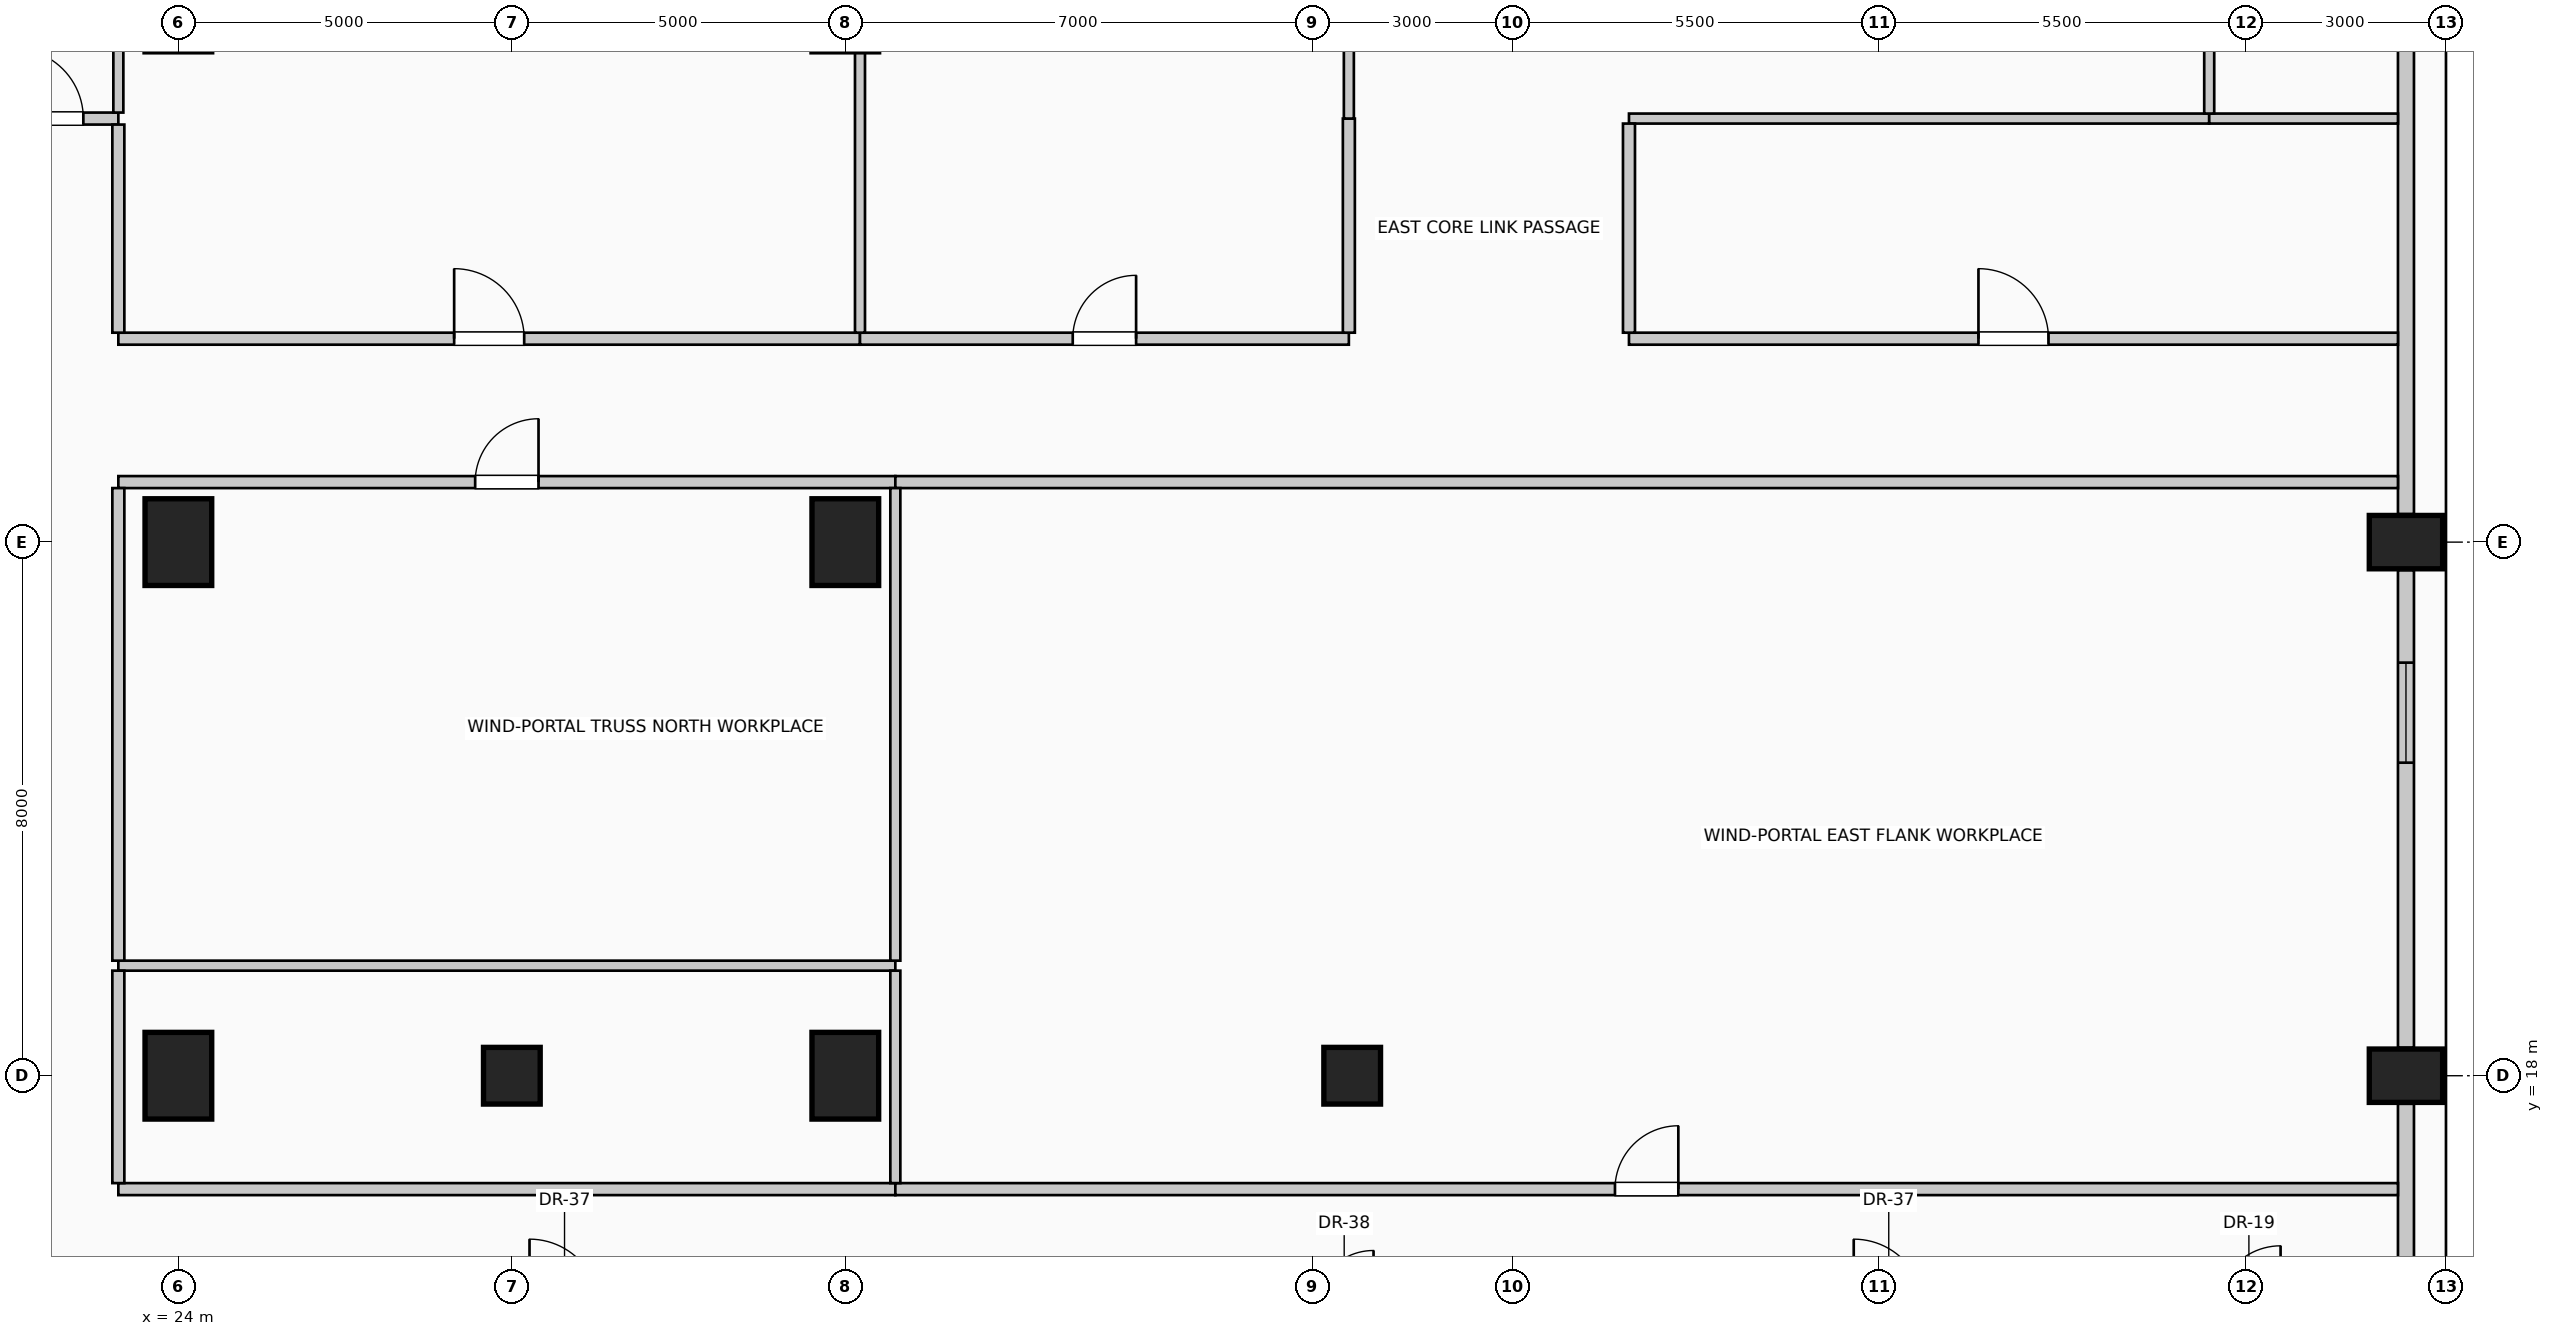
"""IFC4 building model, lengths in metres.
Left out: names, types, materials, properties, quantities, classifications, styles, units other than length and angle.
Written with IfcOpenShell. Run it as: python <this file> out.ifc"""

import sys

from ifc_helpers import new_model, si_unit, direction, frame, frame_2d, origin, origin_2d, place, context, subcontext, project, spatial, rectangle, circle, extrude, element, fill, save


model = new_model("IFC4")
c1 = context("Model", 3, precision=1e-05, world=origin(), true_north=direction((0.0, 1.0)))
c2 = subcontext(c1, "Body", "Model", "MODEL_VIEW")
j1 = project(units=[si_unit("LENGTHUNIT", "METRE"), si_unit("PLANEANGLEUNIT", "RADIAN")], contexts=[c1])
p1 = place(None, origin())
s1 = spatial("IfcSite", under=j1, at=p1, CompositionType="ELEMENT")
p2 = place(p1, origin())
s2 = spatial("IfcBuilding", under=s1, at=p2, CompositionType="ELEMENT")
p3 = place(p2, frame((0.0, 0.0, 210.6)))
s3 = spatial("IfcBuildingStorey", under=s2, at=p3, CompositionType="ELEMENT", Elevation=210.6)
for number, where, z_axis, x_axis in (
    (1, (57.4, 18.0, 0.0), (0.0, 0.0, 1.0), (0.0, 1.0, 0.0)),
    (2, (57.4, 26.0, 0.0), (0.0, 0.0, 1.0), (0.0, 1.0, 0.0)),
):
    element("IfcColumn", number, at=place(p3, frame(where, z_axis=z_axis, x_axis=x_axis)), inside=s3, PredefinedType="COLUMN", context=c2, shape_type="SweptSolid", body=[
        extrude(rectangle(XDim=0.8, YDim=1.1, at=origin_2d()), origin(), (0.0, 0.0, 1.0), 4.0),
    ])
for number, where, z_axis, x_axis in (
    (3, (24.0, 18.0, 0.0), (0.0, 0.0, 1.0), (1.0, 0.0, 0.0)),
    (4, (34.0, 18.0, 0.0), (0.0, 0.0, 1.0), (1.0, 0.0, 0.0)),
    (5, (24.0, 26.0, 0.0), (0.0, 0.0, 1.0), (1.0, 0.0, 0.0)),
    (6, (34.0, 26.0, 0.0), (0.0, 0.0, 1.0), (1.0, 0.0, 0.0)),
    (7, (24.0, 34.0, 0.0), (0.0, 0.0, 1.0), (1.0, 0.0, 0.0)),
    (8, (34.0, 34.0, 0.0), (0.0, 0.0, 1.0), (1.0, 0.0, 0.0)),
):
    element("IfcColumn", number, at=place(p3, frame(where, z_axis=z_axis, x_axis=x_axis)), inside=s3, PredefinedType="COLUMN", context=c2, shape_type="SweptSolid", body=[
        extrude(rectangle(XDim=1.0, YDim=1.3, at=origin_2d()), origin(), (0.0, 0.0, 1.0), 4.0),
    ])
for number, where, z_axis, x_axis in (
    (9, (29.0, 18.0, 0.0), (0.0, 0.0, 1.0), (1.0, 0.0, 0.0)),
    (10, (41.6, 18.0, 0.0), (0.0, 0.0, 1.0), (1.0, 0.0, 0.0)),
):
    element("IfcColumn", number, at=place(p3, frame(where, z_axis=z_axis, x_axis=x_axis)), inside=s3, PredefinedType="COLUMN", context=c2, shape_type="SweptSolid", body=[
        extrude(circle(Radius=0.425, at=origin_2d()), origin(), (0.0, 0.0, 1.0), 4.0),
    ])
p4 = place(p3, frame((57.4, 17.58, 0.0), z_axis=(0.0, 0.0, 1.0), x_axis=(0.0, -1.0, 0.0)))
e11 = element("IfcWall", 11, at=p4, inside=s3, PredefinedType="SOLIDWALL", context=c2, shape_type="SweptSolid", body=[
    extrude(rectangle(XDim=7.16, YDim=0.24, at=frame_2d((3.58, 0.0))), origin(), (0.0, 0.0, 1.0), 3.0),
])
p5 = place(p4, frame((4.273, 0.0, 0.42)))
e12 = element("IfcOpeningElement", 12, at=p5, cuts=e11, PredefinedType="OPENING", context=c2, shape_type="SweptSolid", body=[
    extrude(rectangle(XDim=1.5, YDim=2.2, at=frame_2d((0.75, 1.1))), frame((0.0, 0.13, 0.0), z_axis=(0.0, -1.0, 0.0), x_axis=(1.0, 0.0, 0.0)), (0.0, 0.0, 1.0), 0.26),
])
p6 = place(p3, frame((57.4, 25.58, 0.0), z_axis=(0.0, 0.0, 1.0), x_axis=(0.0, -1.0, 0.0)))
e13 = element("IfcWall", 13, at=p6, inside=s3, PredefinedType="SOLIDWALL", context=c2, shape_type="SweptSolid", body=[
    extrude(rectangle(XDim=7.16, YDim=0.24, at=frame_2d((3.58, 0.0))), origin(), (0.0, 0.0, 1.0), 3.0),
])
p7 = place(p6, frame((1.387, 0.0, 0.42)))
e14 = element("IfcOpeningElement", 14, at=p7, cuts=e13, PredefinedType="OPENING", context=c2, shape_type="SweptSolid", body=[
    extrude(rectangle(XDim=1.5, YDim=2.2, at=frame_2d((0.75, 1.1))), frame((0.0, 0.13, 0.0), z_axis=(0.0, -1.0, 0.0), x_axis=(1.0, 0.0, 0.0)), (0.0, 0.0, 1.0), 0.26),
])
p8 = place(p3, frame((57.4, 33.58, 0.0), z_axis=(0.0, 0.0, 1.0), x_axis=(0.0, -1.0, 0.0)))
e15 = element("IfcWall", 15, at=p8, inside=s3, PredefinedType="SOLIDWALL", context=c2, shape_type="SweptSolid", body=[
    extrude(rectangle(XDim=7.16, YDim=0.24, at=frame_2d((3.58, 0.0))), origin(), (0.0, 0.0, 1.0), 3.0),
])
p9 = place(p3, frame((23.1, 16.3, 0.0), z_axis=(0.0, 0.0, 1.0), x_axis=(1.0, 0.0, 0.0)))
e16 = element("IfcWall", 16, at=p9, inside=s3, PredefinedType="PARTITIONING", context=c2, shape_type="SweptSolid", body=[
    extrude(rectangle(XDim=11.65, YDim=0.18, at=frame_2d((5.825, 0.0))), origin(), (0.0, 0.0, 1.0), 3.75),
])
p10 = place(p3, frame((34.75, 16.3, 0.0), z_axis=(0.0, 0.0, 1.0), x_axis=(1.0, 0.0, 0.0)))
e17 = element("IfcWall", 17, at=p10, inside=s3, PredefinedType="PARTITIONING", context=c2, shape_type="SweptSolid", body=[
    extrude(rectangle(XDim=22.53, YDim=0.18, at=frame_2d((11.265, 0.0))), origin(), (0.0, 0.0, 1.0), 3.75),
])
p11 = place(p10, frame((10.79, 0.0, 0.0)))
e18 = element("IfcOpeningElement", 18, at=p11, cuts=e17, PredefinedType="OPENING", context=c2, shape_type="SweptSolid", body=[
    extrude(rectangle(XDim=0.95, YDim=2.15, at=frame_2d((0.475, 1.075))), frame((0.0, 0.1, 0.0), z_axis=(0.0, -1.0, 0.0), x_axis=(1.0, 0.0, 0.0)), (0.0, 0.0, 1.0), 0.2),
])
p12 = place(p3, frame((23.1, 19.65, 0.0), z_axis=(0.0, 0.0, 1.0), x_axis=(1.0, 0.0, 0.0)))
e19 = element("IfcWall", 19, at=p12, inside=s3, PredefinedType="PARTITIONING", context=c2, shape_type="SweptSolid", body=[
    extrude(rectangle(XDim=11.65, YDim=0.15, at=frame_2d((5.825, 0.0))), origin(), (0.0, 0.0, 1.0), 3.75),
])
p13 = place(p3, frame((23.1, 26.9, 0.0), z_axis=(0.0, 0.0, 1.0), x_axis=(1.0, 0.0, 0.0)))
e20 = element("IfcWall", 20, at=p13, inside=s3, PredefinedType="PARTITIONING", context=c2, shape_type="SweptSolid", body=[
    extrude(rectangle(XDim=11.65, YDim=0.18, at=frame_2d((5.825, 0.0))), origin(), (0.0, 0.0, 1.0), 3.75),
])
p14 = place(p13, frame((5.35, 0.0, 0.0)))
e21 = element("IfcOpeningElement", 21, at=p14, cuts=e20, PredefinedType="OPENING", context=c2, shape_type="SweptSolid", body=[
    extrude(rectangle(XDim=0.95, YDim=2.15, at=frame_2d((0.475, 1.075))), frame((0.0, 0.1, 0.0), z_axis=(0.0, -1.0, 0.0), x_axis=(1.0, 0.0, 0.0)), (0.0, 0.0, 1.0), 0.2),
])
p15 = place(p3, frame((34.75, 26.9, 0.0), z_axis=(0.0, 0.0, 1.0), x_axis=(1.0, 0.0, 0.0)))
e22 = element("IfcWall", 22, at=p15, inside=s3, PredefinedType="PARTITIONING", context=c2, shape_type="SweptSolid", body=[
    extrude(rectangle(XDim=22.53, YDim=0.18, at=frame_2d((11.265, 0.0))), origin(), (0.0, 0.0, 1.0), 3.75),
])
p16 = place(p3, frame((23.1, 29.05, 0.0), z_axis=(0.0, 0.0, 1.0), x_axis=(1.0, 0.0, 0.0)))
e23 = element("IfcWall", 23, at=p16, inside=s3, PredefinedType="PARTITIONING", context=c2, shape_type="SweptSolid", body=[
    extrude(rectangle(XDim=11.12, YDim=0.18, at=frame_2d((5.56, 0.0))), origin(), (0.0, 0.0, 1.0), 3.75),
])
p17 = place(p16, frame((5.035, 0.0, 0.0)))
e24 = element("IfcOpeningElement", 24, at=p17, cuts=e23, PredefinedType="OPENING", context=c2, shape_type="SweptSolid", body=[
    extrude(rectangle(XDim=1.05, YDim=2.15, at=frame_2d((0.525, 1.075))), frame((0.0, 0.1, 0.0), z_axis=(0.0, -1.0, 0.0), x_axis=(1.0, 0.0, 0.0)), (0.0, 0.0, 1.0), 0.2),
])
p18 = place(p3, frame((34.22, 29.05, 0.0), z_axis=(0.0, 0.0, 1.0), x_axis=(1.0, 0.0, 0.0)))
e25 = element("IfcWall", 25, at=p18, inside=s3, PredefinedType="PARTITIONING", context=c2, shape_type="SweptSolid", body=[
    extrude(rectangle(XDim=7.33, YDim=0.18, at=frame_2d((3.665, 0.0))), origin(), (0.0, 0.0, 1.0), 3.75),
])
p19 = place(p18, frame((3.19, 0.0, 0.0)))
e26 = element("IfcOpeningElement", 26, at=p19, cuts=e25, PredefinedType="OPENING", context=c2, shape_type="SweptSolid", body=[
    extrude(rectangle(XDim=0.95, YDim=2.15, at=frame_2d((0.475, 1.075))), frame((0.0, 0.1, 0.0), z_axis=(0.0, -1.0, 0.0), x_axis=(1.0, 0.0, 0.0)), (0.0, 0.0, 1.0), 0.2),
])
p20 = place(p3, frame((45.75, 29.05, 0.0), z_axis=(0.0, 0.0, 1.0), x_axis=(1.0, 0.0, 0.0)))
e27 = element("IfcWall", 27, at=p20, inside=s3, PredefinedType="PARTITIONING", context=c2, shape_type="SweptSolid", body=[
    extrude(rectangle(XDim=11.53, YDim=0.18, at=frame_2d((5.765, 0.0))), origin(), (0.0, 0.0, 1.0), 3.75),
])
p21 = place(p20, frame((5.24, 0.0, 0.0)))
e28 = element("IfcOpeningElement", 28, at=p21, cuts=e27, PredefinedType="OPENING", context=c2, shape_type="SweptSolid", body=[
    extrude(rectangle(XDim=1.05, YDim=2.15, at=frame_2d((0.525, 1.075))), frame((0.0, 0.1, 0.0), z_axis=(0.0, -1.0, 0.0), x_axis=(1.0, 0.0, 0.0)), (0.0, 0.0, 1.0), 0.2),
])
p22 = place(p3, frame((21.0, 32.35, 0.0), z_axis=(0.0, 0.0, 1.0), x_axis=(1.0, 0.0, 0.0)))
e29 = element("IfcWall", 29, at=p22, inside=s3, PredefinedType="PARTITIONING", context=c2, shape_type="SweptSolid", body=[
    extrude(rectangle(XDim=2.1, YDim=0.18, at=frame_2d((1.05, 0.0))), origin(), (0.0, 0.0, 1.0), 3.75),
])
p23 = place(p22, frame((0.525, 0.0, 0.0)))
e30 = element("IfcOpeningElement", 30, at=p23, cuts=e29, PredefinedType="OPENING", context=c2, shape_type="SweptSolid", body=[
    extrude(rectangle(XDim=1.05, YDim=2.15, at=frame_2d((0.525, 1.075))), frame((0.0, 0.1, 0.0), z_axis=(0.0, -1.0, 0.0), x_axis=(1.0, 0.0, 0.0)), (0.0, 0.0, 1.0), 0.2),
])
p24 = place(p3, frame((45.75, 32.35, 0.0), z_axis=(0.0, 0.0, 1.0), x_axis=(1.0, 0.0, 0.0)))
e31 = element("IfcWall", 31, at=p24, inside=s3, PredefinedType="PARTITIONING", context=c2, shape_type="SweptSolid", body=[
    extrude(rectangle(XDim=8.7, YDim=0.15, at=frame_2d((4.35, 0.0))), origin(), (0.0, 0.0, 1.0), 3.75),
])
p25 = place(p3, frame((54.45, 32.35, 0.0), z_axis=(0.0, 0.0, 1.0), x_axis=(1.0, 0.0, 0.0)))
e32 = element("IfcWall", 32, at=p25, inside=s3, PredefinedType="PARTITIONING", context=c2, shape_type="SweptSolid", body=[
    extrude(rectangle(XDim=2.83, YDim=0.15, at=frame_2d((1.415, 0.0))), origin(), (0.0, 0.0, 1.0), 3.75),
])
p26 = place(p3, frame((23.1, 16.39, 0.0), z_axis=(0.0, 0.0, 1.0), x_axis=(0.0, 1.0, 0.0)))
e33 = element("IfcWall", 33, at=p26, inside=s3, PredefinedType="PARTITIONING", context=c2, shape_type="SweptSolid", body=[
    extrude(rectangle(XDim=3.185, YDim=0.18, at=frame_2d((1.593, 0.0))), origin(), (0.0, 0.0, 1.0), 3.75),
])
p27 = place(p3, frame((23.1, 19.725, 0.0), z_axis=(0.0, 0.0, 1.0), x_axis=(0.0, 1.0, 0.0)))
e34 = element("IfcWall", 34, at=p27, inside=s3, PredefinedType="PARTITIONING", context=c2, shape_type="SweptSolid", body=[
    extrude(rectangle(XDim=7.085, YDim=0.18, at=frame_2d((3.542, 0.0))), origin(), (0.0, 0.0, 1.0), 3.75),
])
p28 = place(p3, frame((23.1, 29.14, 0.0), z_axis=(0.0, 0.0, 1.0), x_axis=(0.0, 1.0, 0.0)))
e35 = element("IfcWall", 35, at=p28, inside=s3, PredefinedType="PARTITIONING", context=c2, shape_type="SweptSolid", body=[
    extrude(rectangle(XDim=3.12, YDim=0.18, at=frame_2d((1.56, 0.0))), origin(), (0.0, 0.0, 1.0), 3.75),
])
p29 = place(p3, frame((23.1, 32.44, 0.0), z_axis=(0.0, 0.0, 1.0), x_axis=(0.0, 1.0, 0.0)))
e36 = element("IfcWall", 36, at=p29, inside=s3, PredefinedType="PARTITIONING", context=c2, shape_type="SweptSolid", body=[
    extrude(rectangle(XDim=12.84, YDim=0.15, at=frame_2d((6.42, 0.0))), origin(), (0.0, 0.0, 1.0), 3.75),
])
p30 = place(p3, frame((34.22, 29.14, 0.0), z_axis=(0.0, 0.0, 1.0), x_axis=(0.0, 1.0, 0.0)))
e37 = element("IfcWall", 37, at=p30, inside=s3, PredefinedType="PARTITIONING", context=c2, shape_type="SweptSolid", body=[
    extrude(rectangle(XDim=4.21, YDim=0.15, at=frame_2d((2.105, 0.0))), origin(), (0.0, 0.0, 1.0), 3.145),
])
p31 = place(p3, frame((34.75, 16.39, 0.0), z_axis=(0.0, 0.0, 1.0), x_axis=(0.0, 1.0, 0.0)))
e38 = element("IfcWall", 38, at=p31, inside=s3, PredefinedType="PARTITIONING", context=c2, shape_type="SweptSolid", body=[
    extrude(rectangle(XDim=3.185, YDim=0.15, at=frame_2d((1.593, 0.0))), origin(), (0.0, 0.0, 1.0), 3.75),
])
p32 = place(p3, frame((34.75, 19.725, 0.0), z_axis=(0.0, 0.0, 1.0), x_axis=(0.0, 1.0, 0.0)))
e39 = element("IfcWall", 39, at=p32, inside=s3, PredefinedType="PARTITIONING", context=c2, shape_type="SweptSolid", body=[
    extrude(rectangle(XDim=7.085, YDim=0.15, at=frame_2d((3.542, 0.0))), origin(), (0.0, 0.0, 1.0), 3.75),
])
p33 = place(p3, frame((41.55, 29.14, 0.0), z_axis=(0.0, 0.0, 1.0), x_axis=(0.0, 1.0, 0.0)))
e40 = element("IfcWall", 40, at=p33, inside=s3, PredefinedType="PARTITIONING", context=c2, shape_type="SweptSolid", body=[
    extrude(rectangle(XDim=3.21, YDim=0.18, at=frame_2d((1.605, 0.0))), origin(), (0.0, 0.0, 1.0), 3.145),
])
p34 = place(p3, frame((41.55, 32.35, 0.0), z_axis=(0.0, 0.0, 1.0), x_axis=(0.0, 1.0, 0.0)))
e41 = element("IfcWall", 41, at=p34, inside=s3, PredefinedType="PARTITIONING", context=c2, shape_type="SweptSolid", body=[
    extrude(rectangle(XDim=1.225, YDim=0.15, at=frame_2d((0.612, 0.0))), origin(), (0.0, 0.0, 1.0), 3.145),
])
p35 = place(p3, frame((45.75, 29.14, 0.0), z_axis=(0.0, 0.0, 1.0), x_axis=(0.0, 1.0, 0.0)))
e42 = element("IfcWall", 42, at=p35, inside=s3, PredefinedType="PARTITIONING", context=c2, shape_type="SweptSolid", body=[
    extrude(rectangle(XDim=3.135, YDim=0.18, at=frame_2d((1.567, 0.0))), origin(), (0.0, 0.0, 1.0), 3.75),
])
p36 = place(p3, frame((54.45, 32.425, 0.0), z_axis=(0.0, 0.0, 1.0), x_axis=(0.0, 1.0, 0.0)))
e43 = element("IfcWall", 43, at=p36, inside=s3, PredefinedType="PARTITIONING", context=c2, shape_type="SweptSolid", body=[
    extrude(rectangle(XDim=1.725, YDim=0.15, at=frame_2d((0.862, 0.0))), origin(), (0.0, 0.0, 1.0), 3.75),
])
p37 = place(p7, origin())
e44 = element("IfcWindow", 44, at=p37, inside=s3, PartitioningType="SINGLE_PANEL", PredefinedType="WINDOW", context=c2, shape_type="SweptSolid", body=[
    extrude(rectangle(XDim=1.5, YDim=2.2, at=frame_2d((0.75, 1.1))), frame((0.0, 0.03, 0.0), z_axis=(0.0, -1.0, 0.0), x_axis=(1.0, 0.0, 0.0)), (0.0, 0.0, 1.0), 0.06),
])
fill(e14, e44)
p38 = place(p11, origin())
e45 = element("IfcDoor", 45, at=p38, inside=s3, OperationType="SINGLE_SWING_RIGHT", PredefinedType="DOOR", context=c2, shape_type="SweptSolid", body=[
    extrude(rectangle(XDim=0.95, YDim=2.15, at=frame_2d((0.475, 1.075))), frame((0.0, 0.025, 0.0), z_axis=(0.0, -1.0, 0.0), x_axis=(1.0, 0.0, 0.0)), (0.0, 0.0, 1.0), 0.05),
])
fill(e18, e45)
p39 = place(p14, origin())
e46 = element("IfcDoor", 46, at=p39, inside=s3, OperationType="SINGLE_SWING_RIGHT", PredefinedType="DOOR", context=c2, shape_type="SweptSolid", body=[
    extrude(rectangle(XDim=0.95, YDim=2.15, at=frame_2d((0.475, 1.075))), frame((0.0, 0.025, 0.0), z_axis=(0.0, -1.0, 0.0), x_axis=(1.0, 0.0, 0.0)), (0.0, 0.0, 1.0), 0.05),
])
fill(e21, e46)
p40 = place(p17, origin())
e47 = element("IfcDoor", 47, at=p40, inside=s3, OperationType="SINGLE_SWING_LEFT", PredefinedType="DOOR", context=c2, shape_type="SweptSolid", body=[
    extrude(rectangle(XDim=1.05, YDim=2.15, at=frame_2d((0.525, 1.075))), frame((0.0, 0.025, 0.0), z_axis=(0.0, -1.0, 0.0), x_axis=(1.0, 0.0, 0.0)), (0.0, 0.0, 1.0), 0.05),
])
fill(e24, e47)
p41 = place(p19, origin())
e48 = element("IfcDoor", 48, at=p41, inside=s3, OperationType="SINGLE_SWING_RIGHT", PredefinedType="DOOR", context=c2, shape_type="SweptSolid", body=[
    extrude(rectangle(XDim=0.95, YDim=2.15, at=frame_2d((0.475, 1.075))), frame((0.0, 0.025, 0.0), z_axis=(0.0, -1.0, 0.0), x_axis=(1.0, 0.0, 0.0)), (0.0, 0.0, 1.0), 0.05),
])
fill(e26, e48)
p42 = place(p21, origin())
e49 = element("IfcDoor", 49, at=p42, inside=s3, OperationType="SINGLE_SWING_LEFT", PredefinedType="DOOR", context=c2, shape_type="SweptSolid", body=[
    extrude(rectangle(XDim=1.05, YDim=2.15, at=frame_2d((0.525, 1.075))), frame((0.0, 0.025, 0.0), z_axis=(0.0, -1.0, 0.0), x_axis=(1.0, 0.0, 0.0)), (0.0, 0.0, 1.0), 0.05),
])
fill(e28, e49)
p43 = place(p23, origin())
e50 = element("IfcDoor", 50, at=p43, inside=s3, OperationType="SINGLE_SWING_LEFT", PredefinedType="DOOR", context=c2, shape_type="SweptSolid", body=[
    extrude(rectangle(XDim=1.05, YDim=2.15, at=frame_2d((0.525, 1.075))), frame((0.0, 0.025, 0.0), z_axis=(0.0, -1.0, 0.0), x_axis=(1.0, 0.0, 0.0)), (0.0, 0.0, 1.0), 0.05),
])
fill(e30, e50)
save(model, sys.argv[1])
